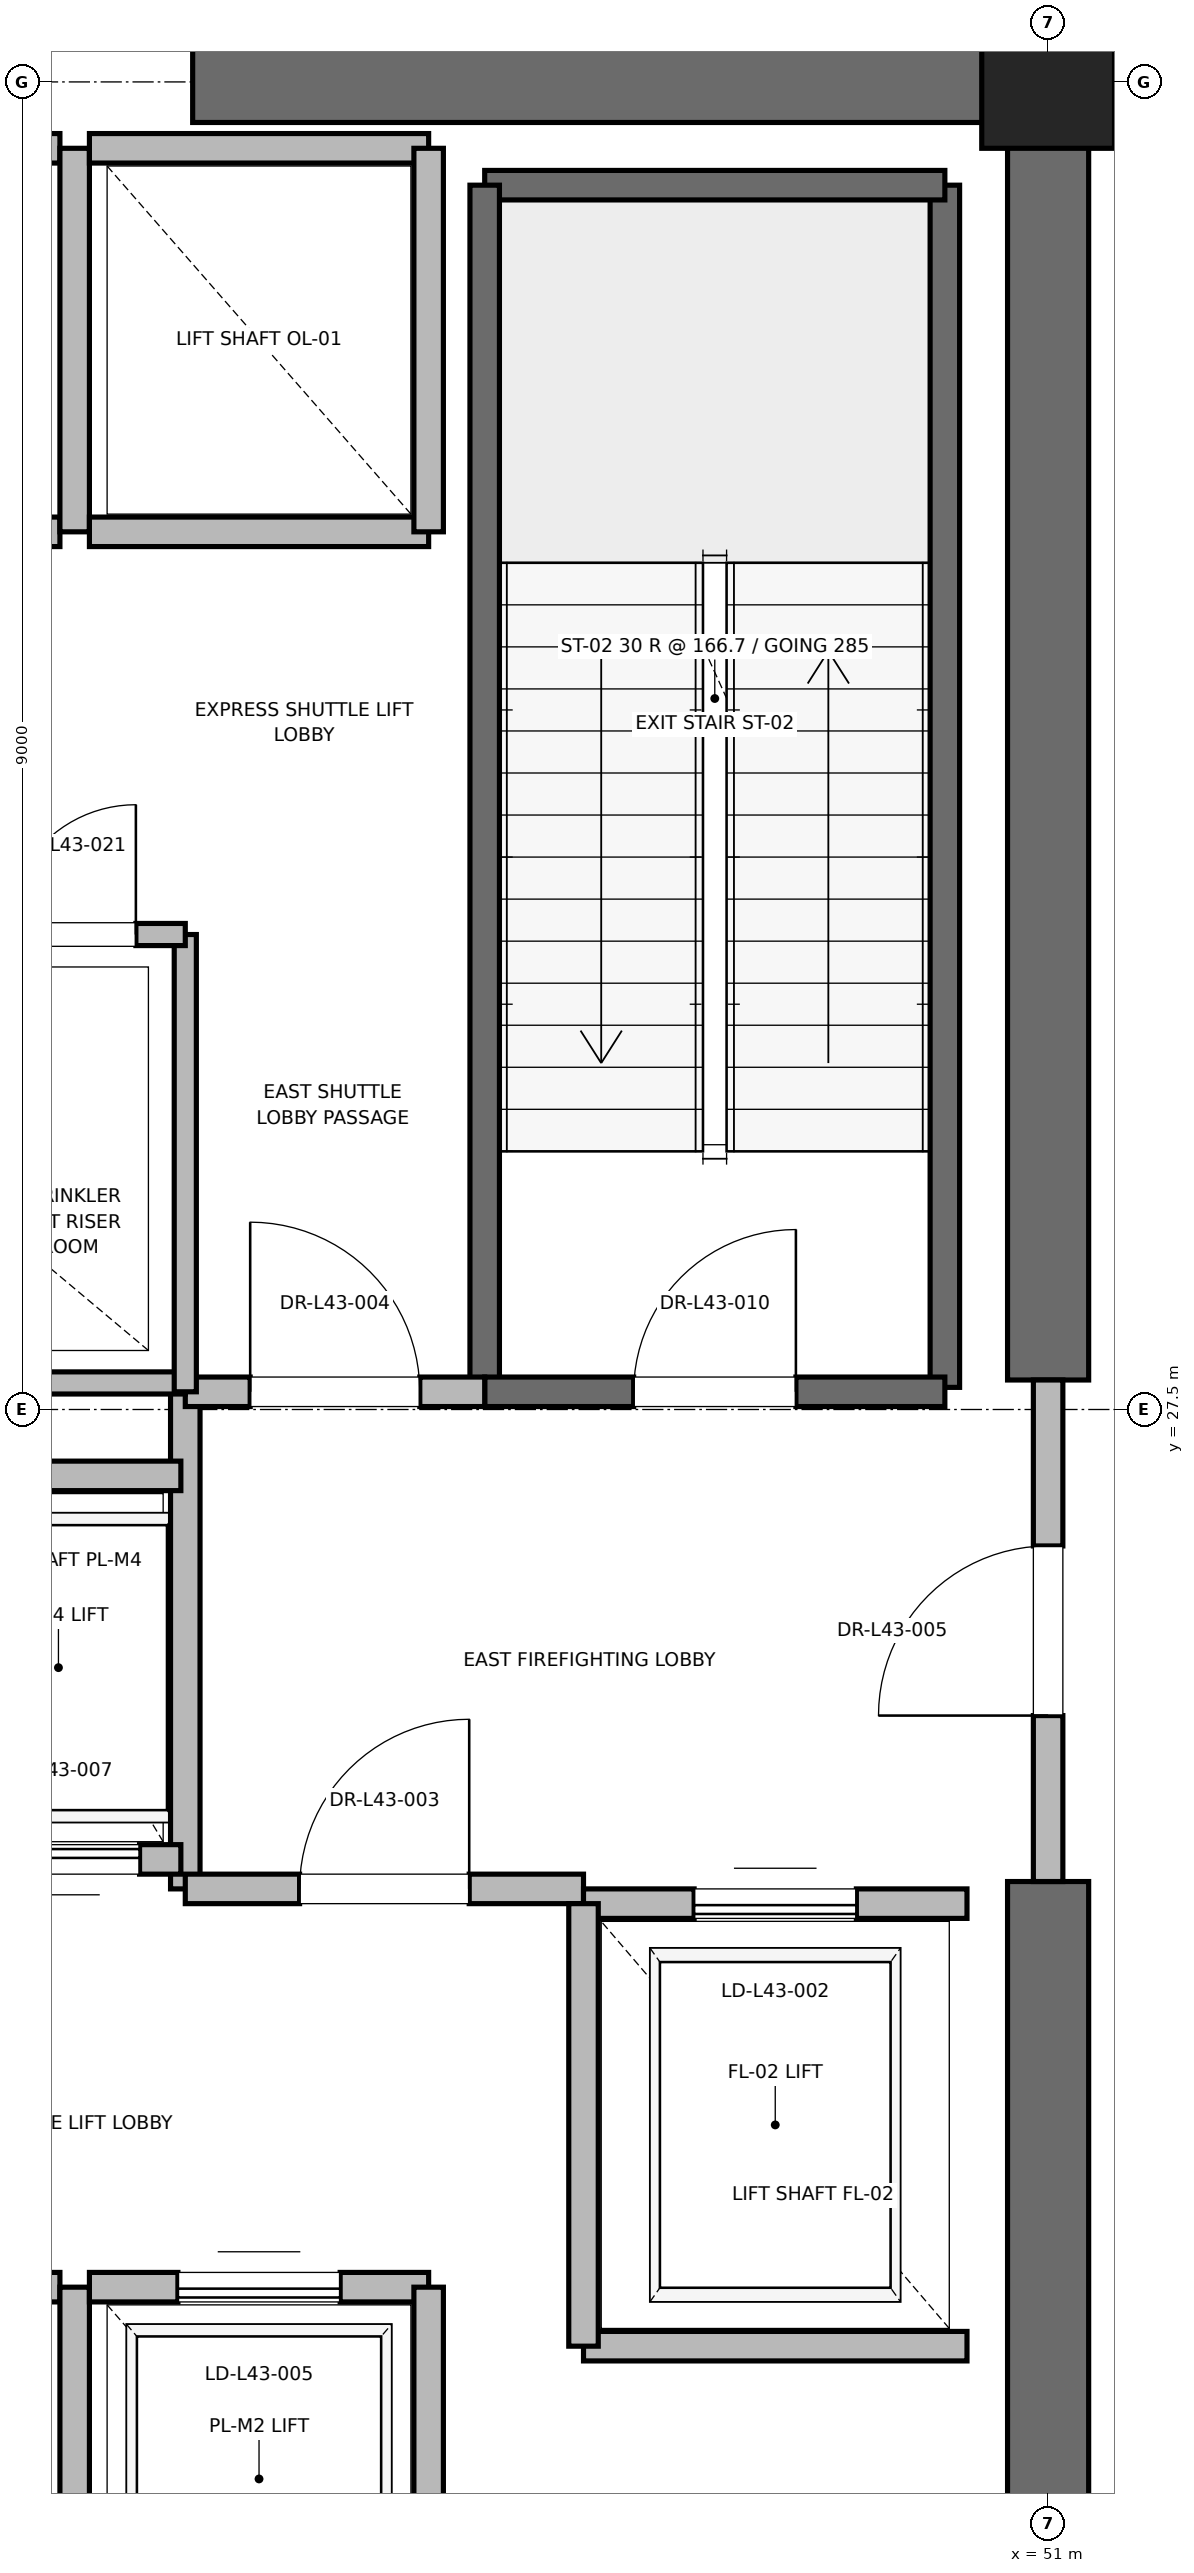
"""IFC4 building model, lengths in metres.
Left out: names, types, materials, properties, quantities, classifications, styles, units other than length and angle.
Written with IfcOpenShell. Run it as: python <this file> out.ifc"""

import sys

from ifc_helpers import new_model, si_unit, direction, frame, frame_2d, origin, origin_2d, place, context, subcontext, project, spatial, rectangle, extrude, element, fill, save


model = new_model("IFC4")
c1 = context("Model", 3, precision=1e-05, world=origin(), true_north=direction((0.0, 1.0)))
c2 = subcontext(c1, "Body", "Model", "MODEL_VIEW")
j1 = project(units=[si_unit("LENGTHUNIT", "METRE"), si_unit("PLANEANGLEUNIT", "RADIAN")], contexts=[c1])
p1 = place(None, origin())
s1 = spatial("IfcSite", under=j1, at=p1, CompositionType="ELEMENT")
p2 = place(p1, origin())
s2 = spatial("IfcBuilding", under=s1, at=p2, CompositionType="ELEMENT")
p3 = place(p2, frame((0.0, 0.0, 184.4)))
s3 = spatial("IfcBuildingStorey", under=s2, at=p3, CompositionType="ELEMENT", Elevation=184.4)
p4 = place(p3, frame((51.0, 36.5, 0.0), z_axis=(0.0, 0.0, 1.0), x_axis=(1.0, 0.0, 0.0)))
e1 = element("IfcColumn", 1, at=p4, inside=s3, PredefinedType="PILASTER", context=c2, shape_type="SweptSolid", body=[
    extrude(rectangle(XDim=0.9, YDim=0.9, at=origin_2d()), origin(), (0.0, 0.0, 1.0), 5.0),
])
for number, where, z_axis, x_axis in (
    (2, (45.2, 36.5, 0.0), (0.0, 0.0, 1.0), (1.0, 0.0, 0.0)),
    (3, (51.0, 18.5, 0.0), (0.0, 0.0, 1.0), (0.0, 1.0, 0.0)),
):
    element("IfcWall", number, at=place(p3, frame(where, z_axis=z_axis, x_axis=x_axis)), inside=s3, PredefinedType="SHEAR", context=c2, shape_type="SweptSolid", body=[
        extrude(rectangle(XDim=5.8, YDim=0.55, at=frame_2d((2.9, 0.0))), origin(), (0.0, 0.0, 1.0), 4.7),
    ])
p5 = place(p3, frame((51.0, 27.7, 0.0), z_axis=(0.0, 0.0, 1.0), x_axis=(0.0, 1.0, 0.0)))
e4 = element("IfcWall", 4, at=p5, inside=s3, PredefinedType="SHEAR", context=c2, shape_type="SweptSolid", body=[
    extrude(rectangle(XDim=8.8, YDim=0.55, at=frame_2d((4.4, 0.0))), origin(), (0.0, 0.0, 1.0), 4.7),
])
p6 = place(p3, frame((50.3, 27.65, 0.0), z_axis=(0.0, 0.0, 1.0), x_axis=(0.0, 1.0, 0.0)))
e5 = element("IfcWall", 5, at=p6, inside=s3, PredefinedType="SOLIDWALL", context=c2, shape_type="SweptSolid", body=[
    extrude(rectangle(XDim=8.15, YDim=0.2, at=frame_2d((4.075, 0.0))), origin(), (0.0, 0.0, 1.0), 4.7),
])
p7 = place(p3, frame((47.18, 35.8, 0.0), z_axis=(0.0, 0.0, 1.0), x_axis=(1.0, 0.0, 0.0)))
e6 = element("IfcWall", 6, at=p7, inside=s3, PredefinedType="SOLIDWALL", context=c2, shape_type="SweptSolid", body=[
    extrude(rectangle(XDim=3.12, YDim=0.2, at=frame_2d((1.56, 0.0))), origin(), (0.0, 0.0, 1.0), 4.7),
])
p8 = place(p3, frame((47.18, 27.62, 0.0), z_axis=(0.0, 0.0, 1.0), x_axis=(0.0, 1.0, 0.0)))
e7 = element("IfcWall", 7, at=p8, inside=s3, PredefinedType="SOLIDWALL", context=c2, shape_type="SweptSolid", body=[
    extrude(rectangle(XDim=8.18, YDim=0.2, at=frame_2d((4.09, 0.0))), origin(), (0.0, 0.0, 1.0), 4.7),
])
p9 = place(p3, frame((47.18, 27.62, 0.0), z_axis=(0.0, 0.0, 1.0), x_axis=(1.0, 0.0, 0.0)))
e8 = element("IfcWall", 8, at=p9, inside=s3, PredefinedType="SOLIDWALL", context=c2, shape_type="SweptSolid", body=[
    extrude(rectangle(XDim=3.12, YDim=0.2, at=frame_2d((1.56, 0.0))), origin(), (0.0, 0.0, 1.0), 4.7),
])
p10 = place(p9, frame((1.01, 0.0, 0.0)))
e9 = element("IfcOpeningElement", 9, at=p10, cuts=e8, PredefinedType="OPENING", context=c2, shape_type="SweptSolid", body=[
    extrude(rectangle(XDim=1.1, YDim=2.15, at=frame_2d((0.55, 1.075))), frame((0.0, 0.1, 0.0), z_axis=(0.0, -1.0, 0.0), x_axis=(1.0, 0.0, 0.0)), (0.0, 0.0, 1.0), 0.2),
])
p11 = place(p3, frame((45.15, 24.25, 0.0), z_axis=(0.0, 0.0, 1.0), x_axis=(0.0, 1.0, 0.0)))
e10 = element("IfcWall", 10, at=p11, inside=s3, PredefinedType="PARTITIONING", context=c2, shape_type="SweptSolid", body=[
    extrude(rectangle(XDim=3.37, YDim=0.2, at=frame_2d((1.685, 0.0))), origin(), (0.0, 0.0, 1.0), 4.7),
])
p12 = place(p3, frame((45.15, 24.25, 0.0), z_axis=(0.0, 0.0, 1.0), x_axis=(1.0, 0.0, 0.0)))
e11 = element("IfcWall", 11, at=p12, inside=s3, PredefinedType="PARTITIONING", context=c2, shape_type="SweptSolid", body=[
    extrude(rectangle(XDim=2.7, YDim=0.2, at=frame_2d((1.35, 0.0))), origin(), (0.0, 0.0, 1.0), 4.7),
])
p13 = place(p12, frame((0.775, 0.0, 0.0)))
e12 = element("IfcOpeningElement", 12, at=p13, cuts=e11, PredefinedType="OPENING", context=c2, shape_type="SweptSolid", body=[
    extrude(rectangle(XDim=1.15, YDim=2.2, at=frame_2d((0.575, 1.1))), frame((0.0, 0.1, 0.0), z_axis=(0.0, -1.0, 0.0), x_axis=(1.0, 0.0, 0.0)), (0.0, 0.0, 1.0), 0.2),
])
p14 = place(p3, frame((45.15, 27.62, 0.0), z_axis=(0.0, 0.0, 1.0), x_axis=(1.0, 0.0, 0.0)))
e13 = element("IfcWall", 13, at=p14, inside=s3, PredefinedType="PARTITIONING", context=c2, shape_type="SweptSolid", body=[
    extrude(rectangle(XDim=2.03, YDim=0.2, at=frame_2d((1.015, 0.0))), origin(), (0.0, 0.0, 1.0), 4.7),
])
p15 = place(p14, frame((0.44, 0.0, 0.0)))
e14 = element("IfcOpeningElement", 14, at=p15, cuts=e13, PredefinedType="OPENING", context=c2, shape_type="SweptSolid", body=[
    extrude(rectangle(XDim=1.15, YDim=2.2, at=frame_2d((0.575, 1.1))), frame((0.0, 0.1, 0.0), z_axis=(0.0, -1.0, 0.0), x_axis=(1.0, 0.0, 0.0)), (0.0, 0.0, 1.0), 0.2),
])
p16 = place(p3, frame((51.0, 24.3, 0.0), z_axis=(0.0, 0.0, 1.0), x_axis=(0.0, 1.0, 0.0)))
e15 = element("IfcWall", 15, at=p16, inside=s3, PredefinedType="PARTITIONING", context=c2, shape_type="SweptSolid", body=[
    extrude(rectangle(XDim=3.4, YDim=0.2, at=frame_2d((1.7, 0.0))), origin(), (0.0, 0.0, 1.0), 3.68),
])
p17 = place(p16, frame((1.125, 0.0, 0.0)))
e16 = element("IfcOpeningElement", 16, at=p17, cuts=e15, PredefinedType="OPENING", context=c2, shape_type="SweptSolid", body=[
    extrude(rectangle(XDim=1.15, YDim=2.2, at=frame_2d((0.575, 1.1))), frame((0.0, 0.1, 0.0), z_axis=(0.0, -1.0, 0.0), x_axis=(1.0, 0.0, 0.0)), (0.0, 0.0, 1.0), 0.2),
])
p18 = place(p3, frame((47.85, 21.15, 0.0), z_axis=(0.0, 0.0, 1.0), x_axis=(1.0, 0.0, 0.0)))
e17 = element("IfcWall", 17, at=p18, inside=s3, PredefinedType="SOLIDWALL", context=c2, shape_type="SweptSolid", body=[
    extrude(rectangle(XDim=2.6, YDim=0.2, at=frame_2d((1.3, 0.0))), origin(), (0.0, 0.0, 1.0), 4.7),
])
p19 = place(p3, frame((50.45, 24.15, 0.0), z_axis=(0.0, 0.0, 1.0), x_axis=(-1.0, 0.0, 0.0)))
e18 = element("IfcWall", 18, at=p19, inside=s3, PredefinedType="SOLIDWALL", context=c2, shape_type="SweptSolid", body=[
    extrude(rectangle(XDim=2.6, YDim=0.2, at=frame_2d((1.3, 0.0))), origin(), (0.0, 0.0, 1.0), 3.68),
])
p20 = place(p19, frame((0.75, 0.0, 0.0)))
e19 = element("IfcOpeningElement", 19, at=p20, cuts=e18, PredefinedType="OPENING", context=c2, shape_type="SweptSolid", body=[
    extrude(rectangle(XDim=1.1, YDim=2.2, at=frame_2d((0.55, 1.1))), frame((0.0, 0.1, 0.0), z_axis=(0.0, -1.0, 0.0), x_axis=(1.0, 0.0, 0.0)), (0.0, 0.0, 1.0), 0.2),
])
p21 = place(p3, frame((47.85, 24.15, 0.0), z_axis=(0.0, 0.0, 1.0), x_axis=(0.0, -1.0, 0.0)))
e20 = element("IfcWall", 20, at=p21, inside=s3, PredefinedType="SOLIDWALL", context=c2, shape_type="SweptSolid", body=[
    extrude(rectangle(XDim=3.0, YDim=0.2, at=frame_2d((1.5, 0.0))), origin(), (0.0, 0.0, 1.0), 4.7),
])
p22 = place(p3, frame((44.3, 21.55, 0.0), z_axis=(0.0, 0.0, 1.0), x_axis=(-1.0, 0.0, 0.0)))
e21 = element("IfcWall", 21, at=p22, inside=s3, PredefinedType="SOLIDWALL", context=c2, shape_type="SweptSolid", body=[
    extrude(rectangle(XDim=2.3, YDim=0.2, at=frame_2d((1.15, 0.0))), origin(), (0.0, 0.0, 1.0), 4.7),
])
p23 = place(p22, frame((0.6, 0.0, 0.0)))
e22 = element("IfcOpeningElement", 22, at=p23, cuts=e21, PredefinedType="OPENING", context=c2, shape_type="SweptSolid", body=[
    extrude(rectangle(XDim=1.1, YDim=2.2, at=frame_2d((0.55, 1.1))), frame((0.0, 0.1, 0.0), z_axis=(0.0, -1.0, 0.0), x_axis=(1.0, 0.0, 0.0)), (0.0, 0.0, 1.0), 0.2),
])
p24 = place(p3, frame((44.4, 18.95, 0.0), z_axis=(0.0, 0.0, 1.0), x_axis=(0.0, 1.0, 0.0)))
e23 = element("IfcWall", 23, at=p24, inside=s3, PredefinedType="SOLIDWALL", context=c2, shape_type="SweptSolid", body=[
    extrude(rectangle(XDim=2.6, YDim=0.2, at=frame_2d((1.3, 0.0))), origin(), (0.0, 0.0, 1.0), 4.7),
])
p25 = place(p3, frame((46.8, 21.55, 0.0), z_axis=(0.0, 0.0, 1.0), x_axis=(-1.0, 0.0, 0.0)))
e24 = element("IfcWall", 24, at=p25, inside=s3, PredefinedType="SOLIDWALL", context=c2, shape_type="SweptSolid", body=[
    extrude(rectangle(XDim=2.3, YDim=0.2, at=frame_2d((1.15, 0.0))), origin(), (0.0, 0.0, 1.0), 4.7),
])
p26 = place(p25, frame((0.6, 0.0, 0.0)))
e25 = element("IfcOpeningElement", 25, at=p26, cuts=e24, PredefinedType="OPENING", context=c2, shape_type="SweptSolid", body=[
    extrude(rectangle(XDim=1.1, YDim=2.2, at=frame_2d((0.55, 1.1))), frame((0.0, 0.1, 0.0), z_axis=(0.0, -1.0, 0.0), x_axis=(1.0, 0.0, 0.0)), (0.0, 0.0, 1.0), 0.2),
])
p27 = place(p3, frame((46.8, 18.95, 0.0), z_axis=(0.0, 0.0, 1.0), x_axis=(0.0, 1.0, 0.0)))
e26 = element("IfcWall", 26, at=p27, inside=s3, PredefinedType="SOLIDWALL", context=c2, shape_type="SweptSolid", body=[
    extrude(rectangle(XDim=2.6, YDim=0.2, at=frame_2d((1.3, 0.0))), origin(), (0.0, 0.0, 1.0), 4.7),
])
p28 = place(p3, frame((43.46, 24.45, 0.0), z_axis=(0.0, 0.0, 1.0), x_axis=(1.0, 0.0, 0.0)))
e27 = element("IfcWall", 27, at=p28, inside=s3, PredefinedType="SOLIDWALL", context=c2, shape_type="SweptSolid", body=[
    extrude(rectangle(XDim=1.66, YDim=0.2, at=frame_2d((0.83, 0.0))), origin(), (0.0, 0.0, 1.0), 4.7),
])
p29 = place(p28, frame((0.28, 0.0, 0.0)))
e28 = element("IfcOpeningElement", 28, at=p29, cuts=e27, PredefinedType="OPENING", context=c2, shape_type="SweptSolid", body=[
    extrude(rectangle(XDim=1.1, YDim=2.2, at=frame_2d((0.55, 1.1))), frame((0.0, 0.1, 0.0), z_axis=(0.0, -1.0, 0.0), x_axis=(1.0, 0.0, 0.0)), (0.0, 0.0, 1.0), 0.2),
])
p30 = place(p3, frame((45.12, 27.05, 0.0), z_axis=(0.0, 0.0, 1.0), x_axis=(-1.0, 0.0, 0.0)))
e29 = element("IfcWall", 29, at=p30, inside=s3, PredefinedType="SOLIDWALL", context=c2, shape_type="SweptSolid", body=[
    extrude(rectangle(XDim=1.66, YDim=0.2, at=frame_2d((0.83, 0.0))), origin(), (0.0, 0.0, 1.0), 4.7),
])
p31 = place(p3, frame((42.0, 33.45, 0.0), z_axis=(0.0, 0.0, 1.0), x_axis=(1.0, 0.0, 0.0)))
e30 = element("IfcWall", 30, at=p31, inside=s3, PredefinedType="SOLIDWALL", context=c2, shape_type="SweptSolid", body=[
    extrude(rectangle(XDim=2.3, YDim=0.2, at=frame_2d((1.15, 0.0))), origin(), (0.0, 0.0, 1.0), 4.7),
])
p32 = place(p3, frame((44.3, 36.05, 0.0), z_axis=(0.0, 0.0, 1.0), x_axis=(-1.0, 0.0, 0.0)))
e31 = element("IfcWall", 31, at=p32, inside=s3, PredefinedType="SOLIDWALL", context=c2, shape_type="SweptSolid", body=[
    extrude(rectangle(XDim=2.3, YDim=0.2, at=frame_2d((1.15, 0.0))), origin(), (0.0, 0.0, 1.0), 3.68),
])
p33 = place(p3, frame((44.4, 33.45, 0.0), z_axis=(0.0, 0.0, 1.0), x_axis=(0.0, 1.0, 0.0)))
e32 = element("IfcWall", 32, at=p33, inside=s3, PredefinedType="SOLIDWALL", context=c2, shape_type="SweptSolid", body=[
    extrude(rectangle(XDim=2.6, YDim=0.2, at=frame_2d((1.3, 0.0))), origin(), (0.0, 0.0, 1.0), 3.68),
])
p34 = place(p3, frame((44.5, 33.45, 0.0), z_axis=(0.0, 0.0, 1.0), x_axis=(1.0, 0.0, 0.0)))
e33 = element("IfcWall", 33, at=p34, inside=s3, PredefinedType="SOLIDWALL", context=c2, shape_type="SweptSolid", body=[
    extrude(rectangle(XDim=2.3, YDim=0.2, at=frame_2d((1.15, 0.0))), origin(), (0.0, 0.0, 1.0), 4.7),
])
p35 = place(p3, frame((46.8, 36.05, 0.0), z_axis=(0.0, 0.0, 1.0), x_axis=(-1.0, 0.0, 0.0)))
e34 = element("IfcWall", 34, at=p35, inside=s3, PredefinedType="SOLIDWALL", context=c2, shape_type="SweptSolid", body=[
    extrude(rectangle(XDim=2.3, YDim=0.2, at=frame_2d((1.15, 0.0))), origin(), (0.0, 0.0, 1.0), 3.68),
])
p36 = place(p3, frame((46.8, 33.45, 0.0), z_axis=(0.0, 0.0, 1.0), x_axis=(0.0, 1.0, 0.0)))
e35 = element("IfcWall", 35, at=p36, inside=s3, PredefinedType="SOLIDWALL", context=c2, shape_type="SweptSolid", body=[
    extrude(rectangle(XDim=2.6, YDim=0.2, at=frame_2d((1.3, 0.0))), origin(), (0.0, 0.0, 1.0), 4.7),
])
p37 = place(p3, frame((41.56, 27.68, 0.0), z_axis=(0.0, 0.0, 1.0), x_axis=(1.0, 0.0, 0.0)))
e36 = element("IfcWall", 36, at=p37, inside=s3, PredefinedType="PARTITIONING", context=c2, shape_type="SweptSolid", body=[
    extrude(rectangle(XDim=3.59, YDim=0.15, at=frame_2d((1.795, 0.0))), origin(), (0.0, 0.0, 1.0), 2.85),
])
p38 = place(p3, frame((45.15, 27.62, 0.0), z_axis=(0.0, 0.0, 1.0), x_axis=(0.0, 1.0, 0.0)))
e37 = element("IfcWall", 37, at=p38, inside=s3, PredefinedType="PARTITIONING", context=c2, shape_type="SweptSolid", body=[
    extrude(rectangle(XDim=3.1, YDim=0.15, at=frame_2d((1.55, 0.0))), origin(), (0.0, 0.0, 1.0), 2.85),
])
p39 = place(p3, frame((43.6, 30.72, 0.0), z_axis=(0.0, 0.0, 1.0), x_axis=(1.0, 0.0, 0.0)))
e38 = element("IfcWall", 38, at=p39, inside=s3, PredefinedType="PARTITIONING", context=c2, shape_type="SweptSolid", body=[
    extrude(rectangle(XDim=1.55, YDim=0.15, at=frame_2d((0.775, 0.0))), origin(), (0.0, 0.0, 1.0), 2.85),
])
p40 = place(p39, frame((0.335, 0.0, 0.0)))
e39 = element("IfcOpeningElement", 39, at=p40, cuts=e38, PredefinedType="OPENING", context=c2, shape_type="SweptSolid", body=[
    extrude(rectangle(XDim=0.88, YDim=2.1, at=frame_2d((0.44, 1.05))), frame((0.0, 0.075, 0.0), z_axis=(0.0, -1.0, 0.0), x_axis=(1.0, 0.0, 0.0)), (0.0, 0.0, 1.0), 0.15),
])
p41 = place(p10, origin())
e40 = element("IfcDoor", 40, at=p41, inside=s3, OperationType="SINGLE_SWING_RIGHT", PredefinedType="DOOR", context=c2, shape_type="SweptSolid", body=[
    extrude(rectangle(XDim=1.1, YDim=2.15, at=frame_2d((0.55, 1.075))), frame((0.0, 0.025, 0.0), z_axis=(0.0, -1.0, 0.0), x_axis=(1.0, 0.0, 0.0)), (0.0, 0.0, 1.0), 0.05),
])
fill(e9, e40)
p42 = place(p13, origin())
e41 = element("IfcDoor", 41, at=p42, inside=s3, OperationType="SINGLE_SWING_RIGHT", PredefinedType="DOOR", context=c2, shape_type="SweptSolid", body=[
    extrude(rectangle(XDim=1.15, YDim=2.2, at=frame_2d((0.575, 1.1))), frame((0.0, 0.025, 0.0), z_axis=(0.0, -1.0, 0.0), x_axis=(1.0, 0.0, 0.0)), (0.0, 0.0, 1.0), 0.05),
])
fill(e12, e41)
p43 = place(p15, origin())
e42 = element("IfcDoor", 42, at=p43, inside=s3, OperationType="SINGLE_SWING_LEFT", PredefinedType="DOOR", context=c2, shape_type="SweptSolid", body=[
    extrude(rectangle(XDim=1.15, YDim=2.2, at=frame_2d((0.575, 1.1))), frame((0.0, 0.025, 0.0), z_axis=(0.0, -1.0, 0.0), x_axis=(1.0, 0.0, 0.0)), (0.0, 0.0, 1.0), 0.05),
])
fill(e14, e42)
p44 = place(p17, origin())
e43 = element("IfcDoor", 43, at=p44, inside=s3, OperationType="SINGLE_SWING_LEFT", PredefinedType="DOOR", context=c2, shape_type="SweptSolid", body=[
    extrude(rectangle(XDim=1.15, YDim=2.2, at=frame_2d((0.575, 1.1))), frame((0.0, 0.025, 0.0), z_axis=(0.0, -1.0, 0.0), x_axis=(1.0, 0.0, 0.0)), (0.0, 0.0, 1.0), 0.05),
])
fill(e16, e43)
p45 = place(p20, origin())
e44 = element("IfcDoor", 44, at=p45, inside=s3, OperationType="SLIDING_TO_RIGHT", PredefinedType="DOOR", context=c2, shape_type="SweptSolid", body=[
    extrude(rectangle(XDim=1.1, YDim=2.2, at=frame_2d((0.55, 1.1))), frame((0.0, 0.025, 0.0), z_axis=(0.0, -1.0, 0.0), x_axis=(1.0, 0.0, 0.0)), (0.0, 0.0, 1.0), 0.05),
])
fill(e19, e44)
p46 = place(p26, origin())
e45 = element("IfcDoor", 45, at=p46, inside=s3, OperationType="SLIDING_TO_RIGHT", PredefinedType="DOOR", context=c2, shape_type="SweptSolid", body=[
    extrude(rectangle(XDim=1.1, YDim=2.2, at=frame_2d((0.55, 1.1))), frame((0.0, 0.025, 0.0), z_axis=(0.0, -1.0, 0.0), x_axis=(1.0, 0.0, 0.0)), (0.0, 0.0, 1.0), 0.05),
])
fill(e25, e45)
p47 = place(p29, origin())
e46 = element("IfcDoor", 46, at=p47, inside=s3, OperationType="SLIDING_TO_RIGHT", PredefinedType="DOOR", context=c2, shape_type="SweptSolid", body=[
    extrude(rectangle(XDim=1.1, YDim=2.2, at=frame_2d((0.55, 1.1))), frame((0.0, 0.025, 0.0), z_axis=(0.0, -1.0, 0.0), x_axis=(1.0, 0.0, 0.0)), (0.0, 0.0, 1.0), 0.05),
])
fill(e28, e46)
p48 = place(p40, origin())
e47 = element("IfcDoor", 47, at=p48, inside=s3, OperationType="SINGLE_SWING_RIGHT", PredefinedType="DOOR", context=c2, shape_type="SweptSolid", body=[
    extrude(rectangle(XDim=0.88, YDim=2.1, at=frame_2d((0.44, 1.05))), frame((0.0, 0.025, 0.0), z_axis=(0.0, -1.0, 0.0), x_axis=(1.0, 0.0, 0.0)), (0.0, 0.0, 1.0), 0.05),
])
fill(e39, e47)
save(model, sys.argv[1])
